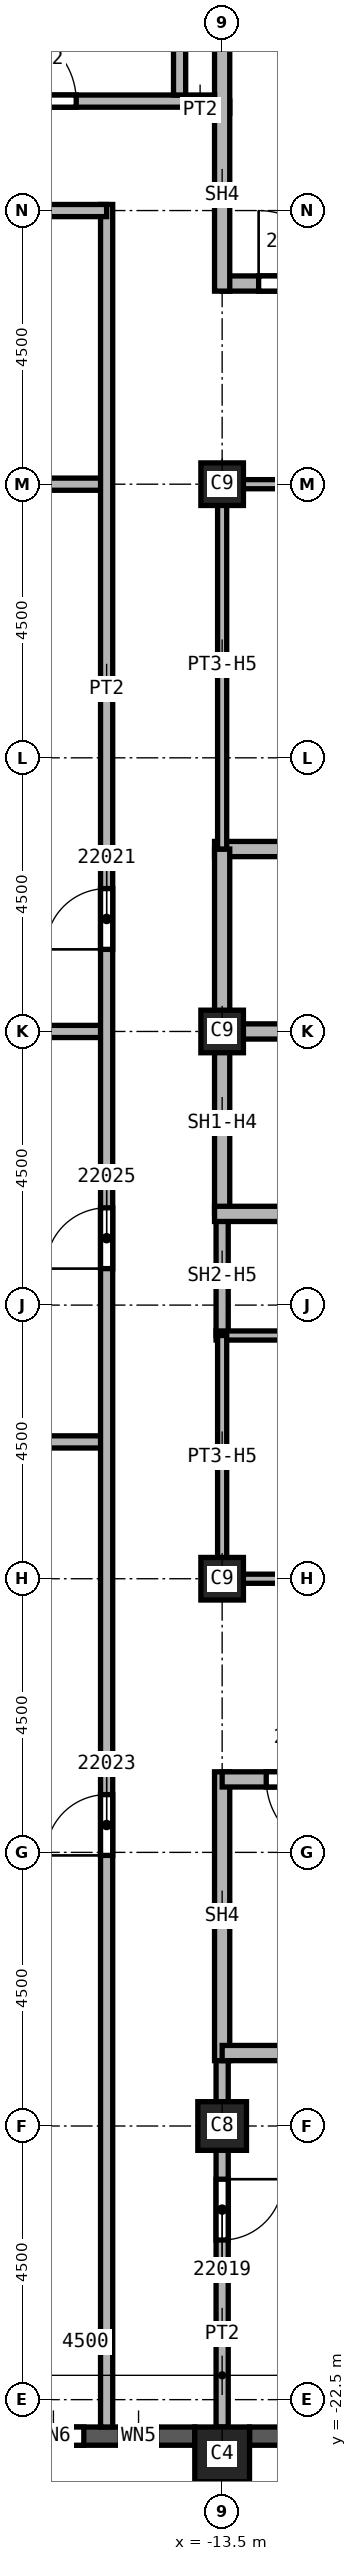
"""IFC4 building model, lengths in metres.
Left out: names, types, materials, properties, quantities, classifications, styles, units other than length and angle.
Written with IfcOpenShell. Run it as: python <this file> out.ifc"""

import sys

from ifc_helpers import new_model, si_unit, direction, frame, frame_2d, origin, origin_2d, place, context, subcontext, project, spatial, rectangle, extrude, element, fill, save


model = new_model("IFC4")
c1 = context("Model", 3, precision=1e-05, world=origin(), true_north=direction((0.0, 1.0)))
c2 = subcontext(c1, "Body", "Model", "MODEL_VIEW")
j1 = project(units=[si_unit("LENGTHUNIT", "METRE"), si_unit("PLANEANGLEUNIT", "RADIAN")], contexts=[c1])
p1 = place(None, origin())
s1 = spatial("IfcSite", under=j1, at=p1, CompositionType="ELEMENT")
p2 = place(p1, origin())
s2 = spatial("IfcBuilding", under=s1, at=p2, CompositionType="ELEMENT")
p3 = place(p2, frame((0.0, 0.0, 316.0)))
s3 = spatial("IfcBuildingStorey", under=s2, at=p3, CompositionType="ELEMENT", Elevation=316.0)
p4 = place(p3, frame((-13.5, -18.0, 0.0), z_axis=(0.0, 0.0, 1.0), x_axis=(1.0, 0.0, 0.0)))
e1 = element("IfcColumn", 1, at=p4, inside=s3, PredefinedType="COLUMN", context=c2, shape_type="SweptSolid", body=[
    extrude(rectangle(XDim=0.8, YDim=0.8, at=origin_2d()), origin(), (0.0, 0.0, 1.0), 3.59),
])
for number, where, z_axis, x_axis in (
    (2, (-13.5, 0.0, 0.0), (0.0, 0.0, 1.0), (1.0, 0.0, 0.0)),
    (3, (-13.5, 9.0, 0.0), (0.0, 0.0, 1.0), (1.0, 0.0, 0.0)),
    (4, (-13.5, -9.0, 0.0), (0.0, 0.0, 1.0), (1.0, 0.0, 0.0)),
):
    element("IfcColumn", number, at=place(p3, frame(where, z_axis=z_axis, x_axis=x_axis)), inside=s3, PredefinedType="COLUMN", context=c2, shape_type="SweptSolid", body=[
        extrude(rectangle(XDim=0.7, YDim=0.7, at=origin_2d()), origin(), (0.0, 0.0, 1.0), 3.59),
    ])
p5 = place(p3, frame((-13.5, -23.4, 0.0), z_axis=(0.0, 0.0, 1.0), x_axis=(1.0, 0.0, 0.0)))
e5 = element("IfcColumn", 5, at=p5, inside=s3, PredefinedType="COLUMN", context=c2, shape_type="SweptSolid", body=[
    extrude(rectangle(XDim=0.9, YDim=0.9, at=origin_2d()), origin(), (0.0, 0.0, 1.0), 3.59),
])
p6 = place(p3, frame((-17.55, -23.1, 0.0), z_axis=(0.0, 0.0, 1.0), x_axis=(1.0, 0.0, 0.0)))
e6 = element("IfcWall", 6, at=p6, inside=s3, PredefinedType="SOLIDWALL", context=c2, shape_type="SweptSolid", body=[
    extrude(rectangle(XDim=3.6, YDim=0.3, at=frame_2d((1.8, 0.0))), origin(), (0.0, 0.0, 1.0), 2.99),
])
p7 = place(p6, frame((0.775, 0.0, 0.8)))
e7 = element("IfcOpeningElement", 7, at=p7, cuts=e6, PredefinedType="OPENING", context=c2, shape_type="SweptSolid", body=[
    extrude(rectangle(XDim=1.0, YDim=1.95, at=frame_2d((0.5, 0.975))), frame((0.0, 0.15, 0.0), z_axis=(0.0, -1.0, 0.0), x_axis=(1.0, 0.0, 0.0)), (0.0, 0.0, 1.0), 0.3),
])
p8 = place(p6, frame((2.375, 0.0, 0.8)))
e8 = element("IfcOpeningElement", 8, at=p8, cuts=e6, PredefinedType="OPENING", context=c2, shape_type="SweptSolid", body=[
    extrude(rectangle(XDim=0.6, YDim=1.95, at=frame_2d((0.3, 0.975))), frame((0.0, 0.15, 0.0), z_axis=(0.0, -1.0, 0.0), x_axis=(1.0, 0.0, 0.0)), (0.0, 0.0, 1.0), 0.3),
])
p9 = place(p3, frame((-13.05, -23.1, 0.0), z_axis=(0.0, 0.0, 1.0), x_axis=(1.0, 0.0, 0.0)))
e9 = element("IfcWall", 9, at=p9, inside=s3, PredefinedType="SOLIDWALL", context=c2, shape_type="SweptSolid", body=[
    extrude(rectangle(XDim=3.6, YDim=0.3, at=frame_2d((1.8, 0.0))), origin(), (0.0, 0.0, 1.0), 2.99),
])
p10 = place(p9, frame((0.6, 0.0, 0.8)))
e10 = element("IfcOpeningElement", 10, at=p10, cuts=e9, PredefinedType="OPENING", context=c2, shape_type="SweptSolid", body=[
    extrude(rectangle(XDim=2.4, YDim=1.95, at=frame_2d((1.2, 0.975))), frame((0.0, 0.15, 0.0), z_axis=(0.0, -1.0, 0.0), x_axis=(1.0, 0.0, 0.0)), (0.0, 0.0, 1.0), 0.3),
])
for number, where, z_axis, x_axis in (
    (11, (-26.55, -6.75, 0.0), (0.0, 0.0, 1.0), (1.0, 0.0, 0.0)),
    (12, (-26.55, 9.0, 0.0), (0.0, 0.0, 1.0), (1.0, 0.0, 0.0)),
    (13, (-15.4, 0.0, 0.0), (0.0, 0.0, 1.0), (-1.0, 0.0, 0.0)),
):
    element("IfcWall", number, at=place(p3, frame(where, z_axis=z_axis, x_axis=x_axis)), inside=s3, PredefinedType="PARTITIONING", context=c2, shape_type="SweptSolid", body=[
        extrude(rectangle(XDim=11.15, YDim=0.2, at=frame_2d((5.575, 0.0))), origin(), (0.0, 0.0, 1.0), 3.59),
    ])
p11 = place(p3, frame((-15.4, -22.95, 0.0), z_axis=(0.0, 0.0, 1.0), x_axis=(0.0, 1.0, 0.0)))
e14 = element("IfcWall", 14, at=p11, inside=s3, PredefinedType="PARTITIONING", context=c2, shape_type="SweptSolid", body=[
    extrude(rectangle(XDim=36.55, YDim=0.2, at=frame_2d((18.275, 0.0))), origin(), (0.0, 0.0, 1.0), 3.59),
])
p12 = place(p11, frame((24.3, 0.0, 0.0)))
e15 = element("IfcOpeningElement", 15, at=p12, cuts=e14, PredefinedType="OPENING", context=c2, shape_type="SweptSolid", body=[
    extrude(rectangle(XDim=1.0, YDim=2.1, at=frame_2d((0.5, 1.05))), frame((0.0, 0.1, 0.0), z_axis=(0.0, -1.0, 0.0), x_axis=(1.0, 0.0, 0.0)), (0.0, 0.0, 1.0), 0.2),
])
p13 = place(p11, frame((9.4, 0.0, 0.0)))
e16 = element("IfcOpeningElement", 16, at=p13, cuts=e14, PredefinedType="OPENING", context=c2, shape_type="SweptSolid", body=[
    extrude(rectangle(XDim=1.0, YDim=2.1, at=frame_2d((0.5, 1.05))), frame((0.0, 0.1, 0.0), z_axis=(0.0, -1.0, 0.0), x_axis=(1.0, 0.0, 0.0)), (0.0, 0.0, 1.0), 0.2),
])
p14 = place(p11, frame((19.05, 0.0, 0.0)))
e17 = element("IfcOpeningElement", 17, at=p14, cuts=e14, PredefinedType="OPENING", context=c2, shape_type="SweptSolid", body=[
    extrude(rectangle(XDim=1.0, YDim=2.1, at=frame_2d((0.5, 1.05))), frame((0.0, 0.1, 0.0), z_axis=(0.0, -1.0, 0.0), x_axis=(1.0, 0.0, 0.0)), (0.0, 0.0, 1.0), 0.2),
])
p15 = place(p3, frame((-15.4, 13.5, 0.0), z_axis=(0.0, 0.0, 1.0), x_axis=(-1.0, 0.0, 0.0)))
e18 = element("IfcWall", 18, at=p15, inside=s3, PredefinedType="PARTITIONING", context=c2, shape_type="SweptSolid", body=[
    extrude(rectangle(XDim=6.6, YDim=0.2, at=frame_2d((3.3, 0.0))), origin(), (0.0, 0.0, 1.0), 3.59),
])
p16 = place(p15, frame((5.35, 0.0, 0.0)))
e19 = element("IfcOpeningElement", 19, at=p16, cuts=e18, PredefinedType="OPENING", context=c2, shape_type="SweptSolid", body=[
    extrude(rectangle(XDim=1.0, YDim=2.1, at=frame_2d((0.5, 1.05))), frame((0.0, 0.1, 0.0), z_axis=(0.0, -1.0, 0.0), x_axis=(1.0, 0.0, 0.0)), (0.0, 0.0, 1.0), 0.2),
])
p17 = place(p3, frame((-14.1, 15.2, 0.0), z_axis=(0.0, 0.0, 1.0), x_axis=(1.0, 0.0, 0.0)))
e20 = element("IfcWall", 20, at=p17, inside=s3, PredefinedType="PARTITIONING", context=c2, shape_type="SweptSolid", body=[
    extrude(rectangle(XDim=0.725, YDim=0.2, at=frame_2d((0.363, 0.0))), origin(), (0.0, 0.0, 1.0), 3.59),
])
p18 = place(p3, frame((-13.5, -16.675, 0.0), z_axis=(0.0, 0.0, 1.0), x_axis=(0.0, -1.0, 0.0)))
e21 = element("IfcWall", 21, at=p18, inside=s3, PredefinedType="PARTITIONING", context=c2, shape_type="SweptSolid", body=[
    extrude(rectangle(XDim=6.275, YDim=0.2, at=frame_2d((3.137, 0.0))), origin(), (0.0, 0.0, 1.0), 3.59),
])
p19 = place(p18, frame((2.2, 0.0, 0.0)))
e22 = element("IfcOpeningElement", 22, at=p19, cuts=e21, PredefinedType="OPENING", context=c2, shape_type="SweptSolid", body=[
    extrude(rectangle(XDim=1.0, YDim=2.1, at=frame_2d((0.5, 1.05))), frame((0.0, 0.1, 0.0), z_axis=(0.0, -1.0, 0.0), x_axis=(1.0, 0.0, 0.0)), (0.0, 0.0, 1.0), 0.2),
])
p20 = place(p3, frame((-13.5, -5.0, 0.0), z_axis=(0.0, 0.0, 1.0), x_axis=(0.0, 1.0, 0.0)))
e23 = element("IfcWall", 23, at=p20, inside=s3, PredefinedType="SOLIDWALL", context=c2, shape_type="SweptSolid", body=[
    extrude(rectangle(XDim=2.0, YDim=0.2, at=frame_2d((1.0, 0.0))), origin(), (0.0, 0.0, 1.0), 2.828),
])
p21 = place(p3, frame((-13.625, 0.0, 0.0), z_axis=(0.0, 0.0, 1.0), x_axis=(1.0, 0.0, 0.0)))
e24 = element("IfcWall", 24, at=p21, inside=s3, PredefinedType="SOLIDWALL", context=c2, shape_type="SweptSolid", body=[
    extrude(rectangle(XDim=3.125, YDim=0.25, at=frame_2d((1.562, 0.0))), origin(), (0.0, 0.0, 1.0), 3.59),
])
p22 = place(p3, frame((-13.625, 3.0, 0.0), z_axis=(0.0, 0.0, 1.0), x_axis=(1.0, 0.0, 0.0)))
e25 = element("IfcWall", 25, at=p22, inside=s3, PredefinedType="SOLIDWALL", context=c2, shape_type="SweptSolid", body=[
    extrude(rectangle(XDim=6.125, YDim=0.25, at=frame_2d((3.062, 0.0))), origin(), (0.0, 0.0, 1.0), 3.59),
])
p23 = place(p22, frame((4.0, 0.0, 0.0)))
e26 = element("IfcOpeningElement", 26, at=p23, cuts=e25, PredefinedType="OPENING", context=c2, shape_type="SweptSolid", body=[
    extrude(rectangle(XDim=1.1, YDim=2.1, at=frame_2d((0.55, 1.05))), frame((0.0, 0.125, 0.0), z_axis=(0.0, -1.0, 0.0), x_axis=(1.0, 0.0, 0.0)), (0.0, 0.0, 1.0), 0.25),
])
p24 = place(p3, frame((-13.5, -3.0, 0.0), z_axis=(0.0, 0.0, 1.0), x_axis=(0.0, 1.0, 0.0)))
e27 = element("IfcWall", 27, at=p24, inside=s3, PredefinedType="SOLIDWALL", context=c2, shape_type="SweptSolid", body=[
    extrude(rectangle(XDim=6.0, YDim=0.25, at=frame_2d((3.0, 0.0))), origin(), (0.0, 0.0, 1.0), 2.828),
])
p25 = place(p3, frame((-13.625, -3.0, 0.0), z_axis=(0.0, 0.0, 1.0), x_axis=(1.0, 0.0, 0.0)))
e28 = element("IfcWall", 28, at=p25, inside=s3, PredefinedType="SOLIDWALL", context=c2, shape_type="SweptSolid", body=[
    extrude(rectangle(XDim=6.125, YDim=0.25, at=frame_2d((3.062, 0.0))), origin(), (0.0, 0.0, 1.0), 3.59),
])
p26 = place(p25, frame((4.0, 0.0, 0.0)))
e29 = element("IfcOpeningElement", 29, at=p26, cuts=e28, PredefinedType="OPENING", context=c2, shape_type="SweptSolid", body=[
    extrude(rectangle(XDim=1.1, YDim=2.1, at=frame_2d((0.55, 1.05))), frame((0.0, 0.125, 0.0), z_axis=(0.0, -1.0, 0.0), x_axis=(1.0, 0.0, 0.0)), (0.0, 0.0, 1.0), 0.25),
])
p27 = place(p3, frame((-13.5, -12.175, 0.0), z_axis=(0.0, 0.0, 1.0), x_axis=(0.0, -1.0, 0.0)))
e30 = element("IfcWall", 30, at=p27, inside=s3, PredefinedType="SOLIDWALL", context=c2, shape_type="SweptSolid", body=[
    extrude(rectangle(XDim=4.75, YDim=0.25, at=frame_2d((2.375, 0.0))), origin(), (0.0, 0.0, 1.0), 3.59),
])
p28 = place(p3, frame((-13.5, 12.3, 0.0), z_axis=(0.0, 0.0, 1.0), x_axis=(1.0, 0.0, 0.0)))
e31 = element("IfcWall", 31, at=p28, inside=s3, PredefinedType="SOLIDWALL", context=c2, shape_type="SweptSolid", body=[
    extrude(rectangle(XDim=9.125, YDim=0.25, at=frame_2d((4.562, 0.0))), origin(), (0.0, 0.0, 1.0), 3.59),
])
p29 = place(p28, frame((0.6, 0.0, 0.0)))
e32 = element("IfcOpeningElement", 32, at=p29, cuts=e31, PredefinedType="OPENING", context=c2, shape_type="SweptSolid", body=[
    extrude(rectangle(XDim=1.2, YDim=2.1, at=frame_2d((0.6, 1.05))), frame((0.0, 0.125, 0.0), z_axis=(0.0, -1.0, 0.0), x_axis=(1.0, 0.0, 0.0)), (0.0, 0.0, 1.0), 0.25),
])
p30 = place(p3, frame((-13.5, 12.175, 0.0), z_axis=(0.0, 0.0, 1.0), x_axis=(0.0, 1.0, 0.0)))
e33 = element("IfcWall", 33, at=p30, inside=s3, PredefinedType="SOLIDWALL", context=c2, shape_type="SweptSolid", body=[
    extrude(rectangle(XDim=4.75, YDim=0.25, at=frame_2d((2.375, 0.0))), origin(), (0.0, 0.0, 1.0), 3.59),
])
p31 = place(p3, frame((-4.5, -16.8, 0.0), z_axis=(0.0, 0.0, 1.0), x_axis=(-1.0, 0.0, 0.0)))
e34 = element("IfcWall", 34, at=p31, inside=s3, PredefinedType="SOLIDWALL", context=c2, shape_type="SweptSolid", body=[
    extrude(rectangle(XDim=9.0, YDim=0.25, at=frame_2d((4.5, 0.0))), origin(), (0.0, 0.0, 1.0), 3.59),
])
p32 = place(p3, frame((-4.375, -12.3, 0.0), z_axis=(0.0, 0.0, 1.0), x_axis=(-1.0, 0.0, 0.0)))
e35 = element("IfcWall", 35, at=p32, inside=s3, PredefinedType="SOLIDWALL", context=c2, shape_type="SweptSolid", body=[
    extrude(rectangle(XDim=9.125, YDim=0.25, at=frame_2d((4.562, 0.0))), origin(), (0.0, 0.0, 1.0), 3.59),
])
p33 = place(p32, frame((7.2, 0.0, 0.0)))
e36 = element("IfcOpeningElement", 36, at=p33, cuts=e35, PredefinedType="OPENING", context=c2, shape_type="SweptSolid", body=[
    extrude(rectangle(XDim=1.2, YDim=2.1, at=frame_2d((0.6, 1.05))), frame((0.0, 0.125, 0.0), z_axis=(0.0, -1.0, 0.0), x_axis=(1.0, 0.0, 0.0)), (0.0, 0.0, 1.0), 0.25),
])
p34 = place(p3, frame((-13.6, -5.0, 0.0), z_axis=(0.0, 0.0, 1.0), x_axis=(1.0, 0.0, 0.0)))
e37 = element("IfcWall", 37, at=p34, inside=s3, PredefinedType="PARTITIONING", context=c2, shape_type="SweptSolid", body=[
    extrude(rectangle(XDim=3.1, YDim=0.15, at=frame_2d((1.55, 0.0))), origin(), (0.0, 0.0, 1.0), 3.59),
])
p35 = place(p3, frame((-13.5, -9.075, 0.0), z_axis=(0.0, 0.0, 1.0), x_axis=(0.0, 1.0, 0.0)))
e38 = element("IfcWall", 38, at=p35, inside=s3, PredefinedType="PARTITIONING", context=c2, shape_type="SweptSolid", body=[
    extrude(rectangle(XDim=4.075, YDim=0.15, at=frame_2d((2.038, 0.0))), origin(), (0.0, 0.0, 1.0), 2.828),
])
p36 = place(p3, frame((-13.5, 3.0, 0.0), z_axis=(0.0, 0.0, 1.0), x_axis=(0.0, 1.0, 0.0)))
e39 = element("IfcWall", 39, at=p36, inside=s3, PredefinedType="PARTITIONING", context=c2, shape_type="SweptSolid", body=[
    extrude(rectangle(XDim=6.075, YDim=0.15, at=frame_2d((3.038, 0.0))), origin(), (0.0, 0.0, 1.0), 2.828),
])
for number, where, z_axis, x_axis in (
    (40, (-13.5, 9.0, 0.0), (0.0, 0.0, 1.0), (1.0, 0.0, 0.0)),
    (41, (-10.5, -9.0, 0.0), (0.0, 0.0, 1.0), (-1.0, 0.0, 0.0)),
):
    element("IfcWall", number, at=place(p3, frame(where, z_axis=z_axis, x_axis=x_axis)), inside=s3, PredefinedType="PARTITIONING", context=c2, shape_type="SweptSolid", body=[
        extrude(rectangle(XDim=3.0, YDim=0.15, at=frame_2d((1.5, 0.0))), origin(), (0.0, 0.0, 1.0), 2.828),
    ])
p37 = place(p3, frame((-21.9, 15.3, 0.0), z_axis=(0.0, 0.0, 1.0), x_axis=(1.0, 0.0, 0.0)))
e42 = element("IfcWall", 42, at=p37, inside=s3, PredefinedType="SOLIDWALL", context=c2, shape_type="SweptSolid", body=[
    extrude(rectangle(XDim=8.275, YDim=0.2, at=frame_2d((4.137, 0.0))), origin(), (0.0, 0.0, 1.0), 3.59),
])
p38 = place(p37, frame((4.8, 0.0, 0.0)))
e43 = element("IfcOpeningElement", 43, at=p38, cuts=e42, PredefinedType="OPENING", context=c2, shape_type="SweptSolid", body=[
    extrude(rectangle(XDim=1.2, YDim=2.1, at=frame_2d((0.6, 1.05))), frame((0.0, 0.1, 0.0), z_axis=(0.0, -1.0, 0.0), x_axis=(1.0, 0.0, 0.0)), (0.0, 0.0, 1.0), 0.2),
])
p39 = place(p3, frame((-14.2, 15.4, 0.0), z_axis=(0.0, 0.0, 1.0), x_axis=(0.0, 1.0, 0.0)))
e44 = element("IfcWall", 44, at=p39, inside=s3, PredefinedType="SOLIDWALL", context=c2, shape_type="SweptSolid", body=[
    extrude(rectangle(XDim=5.9, YDim=0.2, at=frame_2d((2.95, 0.0))), origin(), (0.0, 0.0, 1.0), 3.59),
])
p40 = place(p29, origin())
e45 = element("IfcDoor", 45, at=p40, inside=s3, OperationType="SINGLE_SWING_LEFT", PredefinedType="DOOR", context=c2, shape_type="SweptSolid", body=[
    extrude(rectangle(XDim=1.2, YDim=2.1, at=frame_2d((0.6, 1.05))), frame((0.0, 0.025, 0.0), z_axis=(0.0, -1.0, 0.0), x_axis=(1.0, 0.0, 0.0)), (0.0, 0.0, 1.0), 0.05),
])
fill(e32, e45)
p41 = place(p33, origin())
e46 = element("IfcDoor", 46, at=p41, inside=s3, OperationType="SINGLE_SWING_RIGHT", PredefinedType="DOOR", context=c2, shape_type="SweptSolid", body=[
    extrude(rectangle(XDim=1.2, YDim=2.1, at=frame_2d((0.6, 1.05))), frame((0.0, 0.025, 0.0), z_axis=(0.0, -1.0, 0.0), x_axis=(1.0, 0.0, 0.0)), (0.0, 0.0, 1.0), 0.05),
])
fill(e36, e46)
p42 = place(p19, origin())
e47 = element("IfcDoor", 47, at=p42, inside=s3, OperationType="SINGLE_SWING_RIGHT", PredefinedType="DOOR", context=c2, shape_type="SweptSolid", body=[
    extrude(rectangle(XDim=1.0, YDim=2.1, at=frame_2d((0.5, 1.05))), frame((0.0, 0.025, 0.0), z_axis=(0.0, -1.0, 0.0), x_axis=(1.0, 0.0, 0.0)), (0.0, 0.0, 1.0), 0.05),
])
fill(e22, e47)
p43 = place(p12, origin())
e48 = element("IfcDoor", 48, at=p43, inside=s3, OperationType="SINGLE_SWING_RIGHT", PredefinedType="DOOR", context=c2, shape_type="SweptSolid", body=[
    extrude(rectangle(XDim=1.0, YDim=2.1, at=frame_2d((0.5, 1.05))), frame((0.0, 0.025, 0.0), z_axis=(0.0, -1.0, 0.0), x_axis=(1.0, 0.0, 0.0)), (0.0, 0.0, 1.0), 0.05),
])
fill(e15, e48)
p44 = place(p13, origin())
e49 = element("IfcDoor", 49, at=p44, inside=s3, OperationType="SINGLE_SWING_RIGHT", PredefinedType="DOOR", context=c2, shape_type="SweptSolid", body=[
    extrude(rectangle(XDim=1.0, YDim=2.1, at=frame_2d((0.5, 1.05))), frame((0.0, 0.025, 0.0), z_axis=(0.0, -1.0, 0.0), x_axis=(1.0, 0.0, 0.0)), (0.0, 0.0, 1.0), 0.05),
])
fill(e16, e49)
p45 = place(p14, origin())
e50 = element("IfcDoor", 50, at=p45, inside=s3, OperationType="SINGLE_SWING_RIGHT", PredefinedType="DOOR", context=c2, shape_type="SweptSolid", body=[
    extrude(rectangle(XDim=1.0, YDim=2.1, at=frame_2d((0.5, 1.05))), frame((0.0, 0.025, 0.0), z_axis=(0.0, -1.0, 0.0), x_axis=(1.0, 0.0, 0.0)), (0.0, 0.0, 1.0), 0.05),
])
fill(e17, e50)
p46 = place(p38, origin())
e51 = element("IfcDoor", 51, at=p46, inside=s3, OperationType="SINGLE_SWING_RIGHT", PredefinedType="DOOR", context=c2, shape_type="SweptSolid", body=[
    extrude(rectangle(XDim=1.2, YDim=2.1, at=frame_2d((0.6, 1.05))), frame((0.0, 0.025, 0.0), z_axis=(0.0, -1.0, 0.0), x_axis=(1.0, 0.0, 0.0)), (0.0, 0.0, 1.0), 0.05),
])
fill(e43, e51)
p47 = place(p7, origin())
e52 = element("IfcWindow", 52, at=p47, inside=s3, PartitioningType="SINGLE_PANEL", PredefinedType="WINDOW", context=c2, shape_type="SweptSolid", body=[
    extrude(rectangle(XDim=1.0, YDim=1.95, at=frame_2d((0.5, 0.975))), frame((0.0, 0.03, 0.0), z_axis=(0.0, -1.0, 0.0), x_axis=(1.0, 0.0, 0.0)), (0.0, 0.0, 1.0), 0.06),
])
fill(e7, e52)
p48 = place(p8, origin())
e53 = element("IfcWindow", 53, at=p48, inside=s3, PartitioningType="SINGLE_PANEL", PredefinedType="WINDOW", context=c2, shape_type="SweptSolid", body=[
    extrude(rectangle(XDim=0.6, YDim=1.95, at=frame_2d((0.3, 0.975))), frame((0.0, 0.03, 0.0), z_axis=(0.0, -1.0, 0.0), x_axis=(1.0, 0.0, 0.0)), (0.0, 0.0, 1.0), 0.06),
])
fill(e8, e53)
save(model, sys.argv[1])
